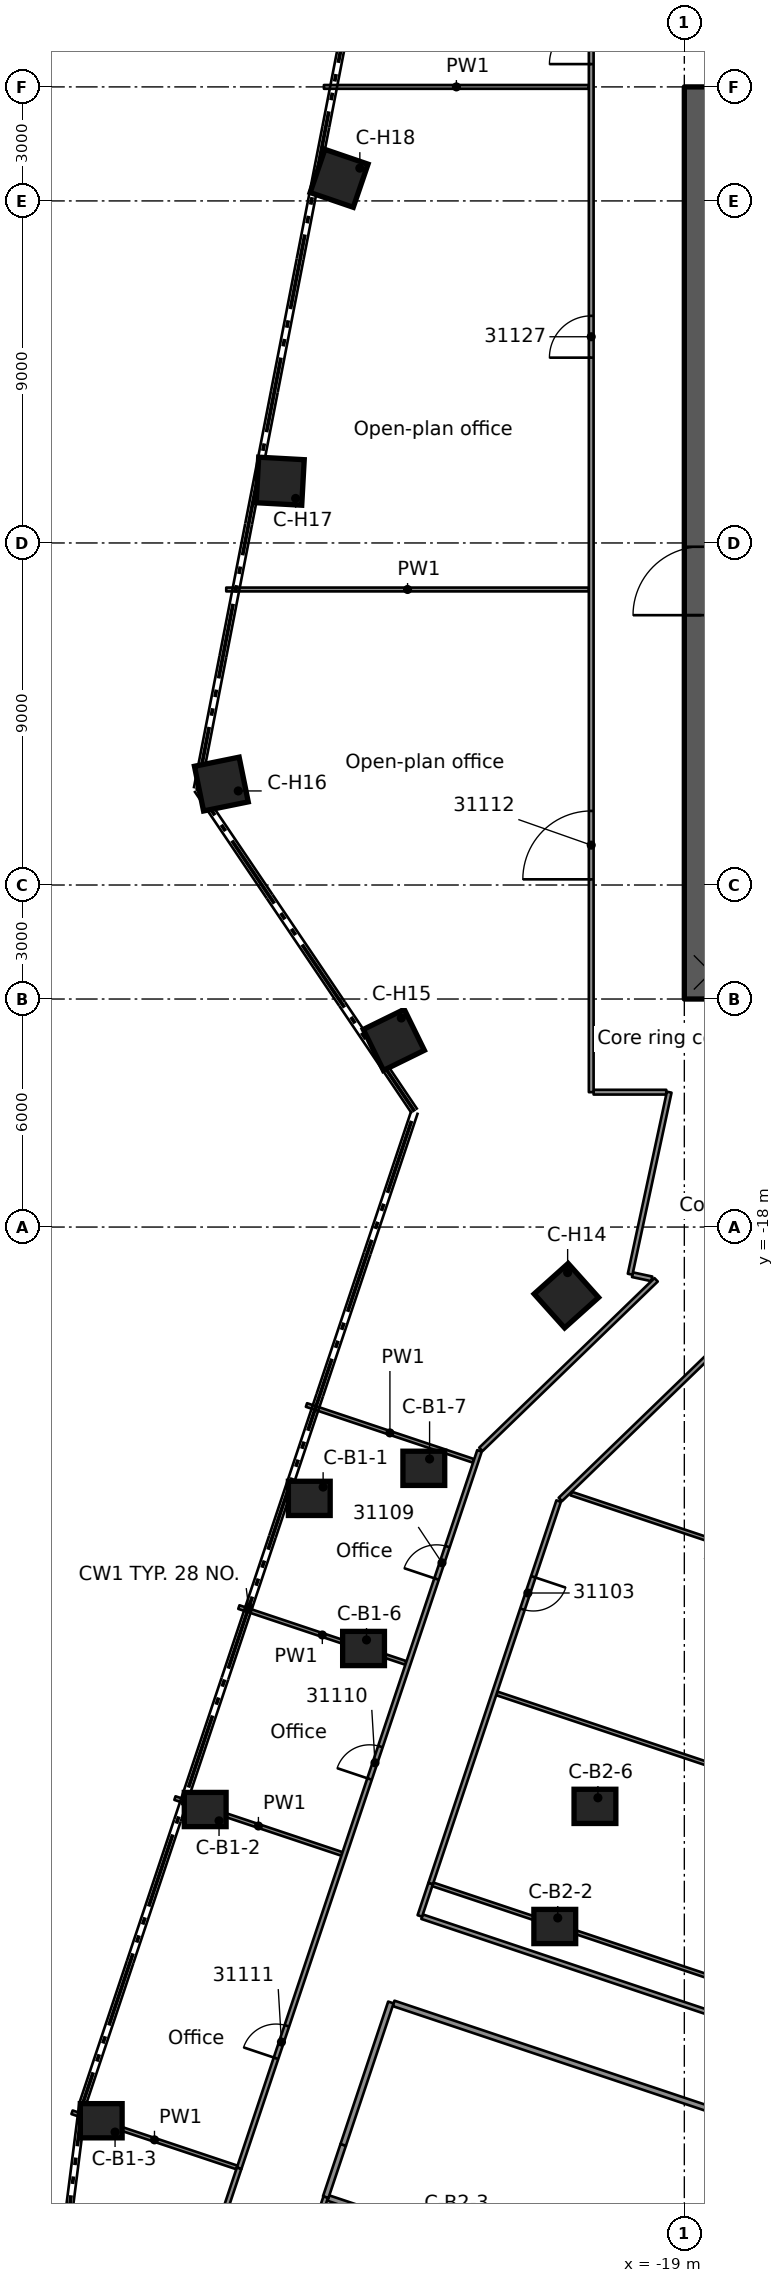
"""IFC4 building model, lengths in metres.
Left out: names, types, materials, properties, quantities, classifications, styles, units other than length and angle.
Written with IfcOpenShell. Run it as: python <this file> out.ifc"""

import sys

from ifc_helpers import new_model, si_unit, direction, frame, frame_2d, origin, origin_2d, place, context, subcontext, project, spatial, rectangle, extrude, element, fill, save


model = new_model("IFC4")
c1 = context("Model", 3, precision=1e-05, world=origin(), true_north=direction((0.0, 1.0)))
c2 = subcontext(c1, "Body", "Model", "MODEL_VIEW")
j1 = project(units=[si_unit("LENGTHUNIT", "METRE"), si_unit("PLANEANGLEUNIT", "RADIAN")], contexts=[c1])
p1 = place(None, origin())
s1 = spatial("IfcSite", under=j1, at=p1, CompositionType="ELEMENT")
p2 = place(p1, origin())
s2 = spatial("IfcBuilding", under=s1, at=p2, CompositionType="ELEMENT")
p3 = place(p2, frame((0.0, 0.0, 156.1)))
s3 = spatial("IfcBuildingStorey", under=s2, at=p3, CompositionType="ELEMENT", Elevation=156.1)
p4 = place(p3, frame((-18.55, -12.0, 0.0), z_axis=(0.0, 0.0, 1.0), x_axis=(0.0, 1.0, 0.0)))
e1 = element("IfcWall", 1, at=p4, inside=s3, PredefinedType="SHEAR", context=c2, shape_type="SweptSolid", body=[
    extrude(rectangle(XDim=24.0, YDim=0.9, at=frame_2d((12.0, 0.0))), origin(), (0.0, 0.0, 1.0), 3.5),
])
p5 = place(p4, frame((10.1, 0.0, 0.0)))
e2 = element("IfcOpeningElement", 2, at=p5, cuts=e1, PredefinedType="OPENING", context=c2, shape_type="SweptSolid", body=[
    extrude(rectangle(XDim=1.8, YDim=2.1, at=frame_2d((0.9, 1.05))), frame((0.0, 0.46, 0.0), z_axis=(0.0, -1.0, 0.0), x_axis=(1.0, 0.0, 0.0)), (0.0, 0.0, 1.0), 0.92),
])
for number, where, z_axis, x_axis in (
    (3, (-28.869, -25.139, 0.0), (0.0, 0.0, 1.0), (1.0, 0.0, 0.0)),
    (4, (-31.608, -33.326, 0.0), (0.0, 0.0, 1.0), (1.0, 0.0, 0.0)),
    (5, (-34.344, -41.515, 0.0), (0.0, 0.0, 1.0), (1.0, 0.0, 0.0)),
    (6, (-27.441, -29.089, 0.0), (0.0, 0.0, 1.0), (1.0, 0.0, 0.0)),
    (7, (-25.855, -24.348, 0.0), (0.0, 0.0, 1.0), (1.0, 0.0, 0.0)),
    (8, (-22.409, -36.404, 0.0), (0.0, 0.0, 1.0), (1.0, 0.0, 0.0)),
    (9, (-21.352, -33.243, 0.0), (0.0, 0.0, 1.0), (1.0, 0.0, 0.0)),
):
    element("IfcColumn", number, at=place(p3, frame(where, z_axis=z_axis, x_axis=x_axis)), inside=s3, PredefinedType="COLUMN", context=c2, shape_type="SweptSolid", body=[
        extrude(rectangle(XDim=1.1, YDim=0.9, at=origin_2d()), origin(), (0.0, 0.0, 1.0), 3.5),
    ])
for number, where, z_axis, x_axis in (
    (10, (-22.104, -19.806, 0.0), (0.0, 0.0, 1.0), (-0.745, -0.667, 0.0)),
    (11, (-26.644, -13.075, 0.0), (0.0, 0.0, 1.0), (-0.898, -0.441, 0.0)),
    (12, (-31.183, -6.344, 0.0), (0.0, 0.0, 1.0), (-0.98, -0.199, 0.0)),
    (13, (-29.634, 1.625, 0.0), (0.0, 0.0, 1.0), (-0.998, 0.055, 0.0)),
    (14, (-28.085, 9.594, 0.0), (0.0, 0.0, 1.0), (-0.946, 0.323, 0.0)),
):
    element("IfcColumn", number, at=place(p3, frame(where, z_axis=z_axis, x_axis=x_axis)), inside=s3, PredefinedType="COLUMN", context=c2, shape_type="SweptSolid", body=[
        extrude(rectangle(XDim=1.2, YDim=1.2, at=origin_2d()), origin(), (0.0, 0.0, 1.0), 3.5),
    ])
p6 = place(p3, frame((-35.112, -41.292, 0.0), z_axis=(0.0, 0.0, 1.0), x_axis=(0.94831984375, -0.317316047419, 0.0)))
e15 = element("IfcWall", 15, at=p6, inside=s3, PredefinedType="PARTITIONING", context=c2, shape_type="SweptSolid", body=[
    extrude(rectangle(XDim=4.576, YDim=0.1, at=frame_2d((2.288, 0.0))), origin(), (0.0, 0.0, 1.0), 3.08),
])
p7 = place(p3, frame((-28.366, -43.55, 0.0), z_axis=(0.0, 0.0, 1.0), x_axis=(0.948327152728, -0.317294203223, 0.0)))
e16 = element("IfcWall", 16, at=p7, inside=s3, PredefinedType="PARTITIONING", context=c2, shape_type="SweptSolid", body=[
    extrude(rectangle(XDim=26.162, YDim=0.15, at=frame_2d((13.081, 0.0))), origin(), (0.0, 0.0, 1.0), 3.08),
])
p8 = place(p3, frame((-1.841, -46.728, 0.0), z_axis=(0.0, 0.0, 1.0), x_axis=(-0.94832621322, 0.317297011205, 0.0)))
e17 = element("IfcWall", 17, at=p8, inside=s3, PredefinedType="PARTITIONING", context=c2, shape_type="SweptSolid", body=[
    extrude(rectangle(XDim=26.162, YDim=0.15, at=frame_2d((13.081, 0.0))), origin(), (0.0, 0.0, 1.0), 3.08),
])
p9 = place(p8, frame((12.525, 0.0, 0.0)))
e18 = element("IfcOpeningElement", 18, at=p9, cuts=e17, PredefinedType="OPENING", context=c2, shape_type="SweptSolid", body=[
    extrude(rectangle(XDim=0.9, YDim=2.1, at=frame_2d((0.45, 1.05))), frame((0.0, 0.085, 0.0), z_axis=(0.0, -1.0, 0.0), x_axis=(1.0, 0.0, 0.0)), (0.0, 0.0, 1.0), 0.17),
])
p10 = place(p3, frame((-25.901, -36.146, 0.0), z_axis=(0.0, 0.0, 1.0), x_axis=(0.948326561211, -0.317295971139, 0.0)))
e19 = element("IfcWall", 19, at=p10, inside=s3, PredefinedType="PARTITIONING", context=c2, shape_type="SweptSolid", body=[
    extrude(rectangle(XDim=26.187, YDim=0.125, at=frame_2d((13.094, 0.0))), origin(), (0.0, 0.0, 1.0), 3.08),
])
p11 = place(p10, frame((11.288, 0.0, 0.0)))
e20 = element("IfcOpeningElement", 20, at=p11, cuts=e19, PredefinedType="OPENING", context=c2, shape_type="SweptSolid", body=[
    extrude(rectangle(XDim=0.9, YDim=2.1, at=frame_2d((0.45, 1.05))), frame((0.0, 0.073, 0.0), z_axis=(0.0, -1.0, 0.0), x_axis=(1.0, 0.0, 0.0)), (0.0, 0.0, 1.0), 0.145),
])
p12 = place(p3, frame((-32.404, -33.025, 0.0), z_axis=(0.0, 0.0, 1.0), x_axis=(0.948382448694, -0.317128887062, 0.0)))
e21 = element("IfcWall", 21, at=p12, inside=s3, PredefinedType="PARTITIONING", context=c2, shape_type="SweptSolid", body=[
    extrude(rectangle(XDim=4.632, YDim=0.1, at=frame_2d((2.316, 0.0))), origin(), (0.0, 0.0, 1.0), 3.08),
])
p13 = place(p3, frame((-25.617, -35.296, 0.0), z_axis=(0.0, 0.0, 1.0), x_axis=(0.948326561211, -0.317295971139, 0.0)))
e22 = element("IfcWall", 22, at=p13, inside=s3, PredefinedType="PARTITIONING", context=c2, shape_type="SweptSolid", body=[
    extrude(rectangle(XDim=26.187, YDim=0.1, at=frame_2d((13.094, 0.0))), origin(), (0.0, 0.0, 1.0), 3.08),
])
p14 = place(p3, frame((-30.722, -27.999, 0.0), z_axis=(0.0, 0.0, 1.0), x_axis=(0.948355935611, -0.317208164132, 0.0)))
e23 = element("IfcWall", 23, at=p14, inside=s3, PredefinedType="PARTITIONING", context=c2, shape_type="SweptSolid", body=[
    extrude(rectangle(XDim=4.631, YDim=0.1, at=frame_2d((2.315, 0.0))), origin(), (0.0, 0.0, 1.0), 3.08),
])
p15 = place(p3, frame((-23.935, -30.27, 0.0), z_axis=(0.0, 0.0, 1.0), x_axis=(0.948326561211, -0.317295971139, 0.0)))
e24 = element("IfcWall", 24, at=p15, inside=s3, PredefinedType="PARTITIONING", context=c2, shape_type="SweptSolid", body=[
    extrude(rectangle(XDim=26.187, YDim=0.1, at=frame_2d((13.094, 0.0))), origin(), (0.0, 0.0, 1.0), 3.08),
])
p16 = place(p3, frame((-28.943, -22.682, 0.0), z_axis=(0.0, 0.0, 1.0), x_axis=(0.948361239818, -0.317192305725, 0.0)))
e25 = element("IfcWall", 25, at=p16, inside=s3, PredefinedType="PARTITIONING", context=c2, shape_type="SweptSolid", body=[
    extrude(rectangle(XDim=4.631, YDim=0.1, at=frame_2d((2.316, 0.0))), origin(), (0.0, 0.0, 1.0), 3.08),
])
p17 = place(p3, frame((-21.98, -25.012, 0.0), z_axis=(0.0, 0.0, 1.0), x_axis=(0.948330909895, -0.317282973603, 0.0)))
e26 = element("IfcWall", 26, at=p17, inside=s3, PredefinedType="PARTITIONING", context=c2, shape_type="SweptSolid", body=[
    extrude(rectangle(XDim=25.816, YDim=0.1, at=frame_2d((12.908, 0.0))), origin(), (0.0, 0.0, 1.0), 3.08),
])
p18 = place(p3, frame((-20.364, -19.254, 0.0), z_axis=(0.0, 0.0, 1.0), x_axis=(0.977699164018, -0.210010344217, 0.0)))
e27 = element("IfcWall", 27, at=p18, inside=s3, PredefinedType="PARTITIONING", context=c2, shape_type="SweptSolid", body=[
    extrude(rectangle(XDim=0.52, YDim=0.125, at=frame_2d((0.26, 0.0))), origin(), (0.0, 0.0, 1.0), 3.08),
])
p19 = place(p3, frame((-21.387, -14.451, 0.0), z_axis=(0.0, 0.0, 1.0), x_axis=(1.0, 0.0, 0.0)))
e28 = element("IfcWall", 28, at=p19, inside=s3, PredefinedType="PARTITIONING", context=c2, shape_type="SweptSolid", body=[
    extrude(rectangle(XDim=1.912, YDim=0.125, at=frame_2d((0.956, 0.0))), origin(), (0.0, 0.0, 1.0), 3.08),
])
p20 = place(p3, frame((-31.054, -1.224, 0.0), z_axis=(0.0, 0.0, 1.0), x_axis=(1.0, 0.0, 0.0)))
e29 = element("IfcWall", 29, at=p20, inside=s3, PredefinedType="PARTITIONING", context=c2, shape_type="SweptSolid", body=[
    extrude(rectangle(XDim=9.542, YDim=0.1, at=frame_2d((4.771, 0.0))), origin(), (0.0, 0.0, 1.0), 3.08),
])
p21 = place(p3, frame((-28.484, 12.0, 0.0), z_axis=(0.0, 0.0, 1.0), x_axis=(1.0, 0.0, 0.0)))
e30 = element("IfcWall", 30, at=p21, inside=s3, PredefinedType="PARTITIONING", context=c2, shape_type="SweptSolid", body=[
    extrude(rectangle(XDim=6.972, YDim=0.1, at=frame_2d((3.486, 0.0))), origin(), (0.0, 0.0, 1.0), 3.08),
])
p22 = place(p3, frame((-17.547, -20.605, 0.0), z_axis=(0.0, 0.0, 1.0), x_axis=(-0.718656118165, -0.695365647572, 0.0)))
e31 = element("IfcWall", 31, at=p22, inside=s3, PredefinedType="PARTITIONING", context=c2, shape_type="SweptSolid", body=[
    extrude(rectangle(XDim=6.562, YDim=0.125, at=frame_2d((3.281, 0.0))), origin(), (0.0, 0.0, 1.0), 3.08),
])
p23 = place(p3, frame((-24.354, -23.85, 0.0), z_axis=(0.0, 0.0, 1.0), x_axis=(0.718689835624, 0.695330799095, 0.0)))
e32 = element("IfcWall", 32, at=p23, inside=s3, PredefinedType="PARTITIONING", context=c2, shape_type="SweptSolid", body=[
    extrude(rectangle(XDim=6.417, YDim=0.125, at=frame_2d((3.208, 0.0))), origin(), (0.0, 0.0, 1.0), 3.08),
])
p24 = place(p3, frame((-28.437, -43.526, 0.0), z_axis=(0.0, 0.0, 1.0), x_axis=(0.317640646832, 0.94821116819, 0.0)))
e33 = element("IfcWall", 33, at=p24, inside=s3, PredefinedType="PARTITIONING", context=c2, shape_type="SweptSolid", body=[
    extrude(rectangle(XDim=1.451, YDim=0.15, at=frame_2d((0.726, 0.0))), origin(), (0.0, 0.0, 1.0), 3.08),
])
p25 = place(p3, frame((-27.976, -42.15, 0.0), z_axis=(0.0, 0.0, 1.0), x_axis=(0.317413881712, 0.948287101935, 0.0)))
e34 = element("IfcWall", 34, at=p25, inside=s3, PredefinedType="PARTITIONING", context=c2, shape_type="SweptSolid", body=[
    extrude(rectangle(XDim=3.951, YDim=0.15, at=frame_2d((1.976, 0.0))), origin(), (0.0, 0.0, 1.0), 3.08),
])
p26 = place(p3, frame((-22.307, -25.21, 0.0), z_axis=(0.0, 0.0, 1.0), x_axis=(-0.317400526235, -0.948291572221, 0.0)))
e35 = element("IfcWall", 35, at=p26, inside=s3, PredefinedType="PARTITIONING", context=c2, shape_type="SweptSolid", body=[
    extrude(rectangle(XDim=10.615, YDim=0.125, at=frame_2d((5.307, 0.0))), origin(), (0.0, 0.0, 1.0), 3.08),
])
p27 = place(p26, frame((2.101, 0.0, 0.0)))
e36 = element("IfcOpeningElement", 36, at=p27, cuts=e35, PredefinedType="OPENING", context=c2, shape_type="SweptSolid", body=[
    extrude(rectangle(XDim=0.9, YDim=2.1, at=frame_2d((0.45, 1.05))), frame((0.0, 0.073, 0.0), z_axis=(0.0, -1.0, 0.0), x_axis=(1.0, 0.0, 0.0)), (0.0, 0.0, 1.0), 0.145),
])
p28 = place(p3, frame((-29.23, -45.897, 0.0), z_axis=(0.0, 0.0, 1.0), x_axis=(0.317165045262, 0.948370357015, 0.0)))
e37 = element("IfcWall", 37, at=p28, inside=s3, PredefinedType="PARTITIONING", context=c2, shape_type="SweptSolid", body=[
    extrude(rectangle(XDim=2.5, YDim=0.125, at=frame_2d((1.25, 0.0))), origin(), (0.0, 0.0, 1.0), 3.08),
])
p29 = place(p3, frame((-25.96, -36.126, 0.0), z_axis=(0.0, 0.0, 1.0), x_axis=(0.316799745903, 0.948492446462, 0.0)))
e38 = element("IfcWall", 38, at=p29, inside=s3, PredefinedType="PARTITIONING", context=c2, shape_type="SweptSolid", body=[
    extrude(rectangle(XDim=0.896, YDim=0.125, at=frame_2d((0.448, 0.0))), origin(), (0.0, 0.0, 1.0), 3.08),
])
p30 = place(p3, frame((-30.714, -42.764, 0.0), z_axis=(0.0, 0.0, 1.0), x_axis=(0.317699123241, 0.94819157721, 0.0)))
e39 = element("IfcWall", 39, at=p30, inside=s3, PredefinedType="PARTITIONING", context=c2, shape_type="SweptSolid", body=[
    extrude(rectangle(XDim=19.906, YDim=0.125, at=frame_2d((9.953, 0.0))), origin(), (0.0, 0.0, 1.0), 3.08),
])
p31 = place(p30, frame((16.35, 0.0, 0.0)))
e40 = element("IfcOpeningElement", 40, at=p31, cuts=e39, PredefinedType="OPENING", context=c2, shape_type="SweptSolid", body=[
    extrude(rectangle(XDim=0.9, YDim=2.1, at=frame_2d((0.45, 1.05))), frame((0.0, 0.073, 0.0), z_axis=(0.0, -1.0, 0.0), x_axis=(1.0, 0.0, 0.0)), (0.0, 0.0, 1.0), 0.145),
])
p32 = place(p30, frame((10.8, 0.0, 0.0)))
e41 = element("IfcOpeningElement", 41, at=p32, cuts=e39, PredefinedType="OPENING", context=c2, shape_type="SweptSolid", body=[
    extrude(rectangle(XDim=0.9, YDim=2.1, at=frame_2d((0.45, 1.05))), frame((0.0, 0.073, 0.0), z_axis=(0.0, -1.0, 0.0), x_axis=(1.0, 0.0, 0.0)), (0.0, 0.0, 1.0), 0.145),
])
p33 = place(p30, frame((3.051, 0.0, 0.0)))
e42 = element("IfcOpeningElement", 42, at=p33, cuts=e39, PredefinedType="OPENING", context=c2, shape_type="SweptSolid", body=[
    extrude(rectangle(XDim=0.9, YDim=2.1, at=frame_2d((0.45, 1.05))), frame((0.0, 0.073, 0.0), z_axis=(0.0, -1.0, 0.0), x_axis=(1.0, 0.0, 0.0)), (0.0, 0.0, 1.0), 0.145),
])
p34 = place(p3, frame((-30.715, -42.765, 0.0), z_axis=(0.0, 0.0, 1.0), x_axis=(-0.31696020199, -0.948438838489, 0.0)))
e43 = element("IfcWall", 43, at=p34, inside=s3, PredefinedType="PARTITIONING", context=c2, shape_type="SweptSolid", body=[
    extrude(rectangle(XDim=5.199, YDim=0.125, at=frame_2d((2.6, 0.0))), origin(), (0.0, 0.0, 1.0), 3.08),
])
p35 = place(p3, frame((-19.398, -14.451, 0.0), z_axis=(0.0, 0.0, 1.0), x_axis=(-0.209848984455, -0.977733810259, 0.0)))
e44 = element("IfcWall", 44, at=p35, inside=s3, PredefinedType="PARTITIONING", context=c2, shape_type="SweptSolid", body=[
    extrude(rectangle(XDim=4.899, YDim=0.125, at=frame_2d((2.45, 0.0))), origin(), (0.0, 0.0, 1.0), 3.08),
])
p36 = place(p3, frame((-21.45, -14.451, 0.0), z_axis=(0.0, 0.0, 1.0), x_axis=(0.0, 1.0, 0.0)))
e45 = element("IfcWall", 45, at=p36, inside=s3, PredefinedType="PARTITIONING", context=c2, shape_type="SweptSolid", body=[
    extrude(rectangle(XDim=28.902, YDim=0.125, at=frame_2d((14.451, 0.0))), origin(), (0.0, 0.0, 1.0), 3.08),
])
p37 = place(p36, frame((5.6, 0.0, 0.0)))
e46 = element("IfcOpeningElement", 46, at=p37, cuts=e45, PredefinedType="OPENING", context=c2, shape_type="SweptSolid", body=[
    extrude(rectangle(XDim=1.8, YDim=2.1, at=frame_2d((0.9, 1.05))), frame((0.0, 0.073, 0.0), z_axis=(0.0, -1.0, 0.0), x_axis=(1.0, 0.0, 0.0)), (0.0, 0.0, 1.0), 0.145),
])
p38 = place(p36, frame((27.051, 0.0, 0.0)))
e47 = element("IfcOpeningElement", 47, at=p38, cuts=e45, PredefinedType="OPENING", context=c2, shape_type="SweptSolid", body=[
    extrude(rectangle(XDim=1.1, YDim=2.1, at=frame_2d((0.55, 1.05))), frame((0.0, 0.073, 0.0), z_axis=(0.0, -1.0, 0.0), x_axis=(1.0, 0.0, 0.0)), (0.0, 0.0, 1.0), 0.145),
])
p39 = place(p36, frame((19.327, 0.0, 0.0)))
e48 = element("IfcOpeningElement", 48, at=p39, cuts=e45, PredefinedType="OPENING", context=c2, shape_type="SweptSolid", body=[
    extrude(rectangle(XDim=1.1, YDim=2.1, at=frame_2d((0.55, 1.05))), frame((0.0, 0.073, 0.0), z_axis=(0.0, -1.0, 0.0), x_axis=(1.0, 0.0, 0.0)), (0.0, 0.0, 1.0), 0.145),
])
p40 = place(p5, origin())
e49 = element("IfcDoor", 49, at=p40, inside=s3, OperationType="SINGLE_SWING_LEFT", PredefinedType="DOOR", context=c2, shape_type="SweptSolid", body=[
    extrude(rectangle(XDim=1.8, YDim=2.1, at=frame_2d((0.9, 1.05))), frame((0.0, 0.025, 0.0), z_axis=(0.0, -1.0, 0.0), x_axis=(1.0, 0.0, 0.0)), (0.0, 0.0, 1.0), 0.05),
])
fill(e2, e49)
p41 = place(p27, origin())
e50 = element("IfcDoor", 50, at=p41, inside=s3, OperationType="SINGLE_SWING_LEFT", PredefinedType="DOOR", context=c2, shape_type="SweptSolid", body=[
    extrude(rectangle(XDim=0.9, YDim=2.1, at=frame_2d((0.45, 1.05))), frame((0.0, 0.025, 0.0), z_axis=(0.0, -1.0, 0.0), x_axis=(1.0, 0.0, 0.0)), (0.0, 0.0, 1.0), 0.05),
])
fill(e36, e50)
p42 = place(p31, origin())
e51 = element("IfcDoor", 51, at=p42, inside=s3, OperationType="SINGLE_SWING_RIGHT", PredefinedType="DOOR", context=c2, shape_type="SweptSolid", body=[
    extrude(rectangle(XDim=0.9, YDim=2.1, at=frame_2d((0.45, 1.05))), frame((0.0, 0.025, 0.0), z_axis=(0.0, -1.0, 0.0), x_axis=(1.0, 0.0, 0.0)), (0.0, 0.0, 1.0), 0.05),
])
fill(e40, e51)
p43 = place(p32, origin())
e52 = element("IfcDoor", 52, at=p43, inside=s3, OperationType="SINGLE_SWING_RIGHT", PredefinedType="DOOR", context=c2, shape_type="SweptSolid", body=[
    extrude(rectangle(XDim=0.9, YDim=2.1, at=frame_2d((0.45, 1.05))), frame((0.0, 0.025, 0.0), z_axis=(0.0, -1.0, 0.0), x_axis=(1.0, 0.0, 0.0)), (0.0, 0.0, 1.0), 0.05),
])
fill(e41, e52)
p44 = place(p33, origin())
e53 = element("IfcDoor", 53, at=p44, inside=s3, OperationType="SINGLE_SWING_LEFT", PredefinedType="DOOR", context=c2, shape_type="SweptSolid", body=[
    extrude(rectangle(XDim=0.9, YDim=2.1, at=frame_2d((0.45, 1.05))), frame((0.0, 0.025, 0.0), z_axis=(0.0, -1.0, 0.0), x_axis=(1.0, 0.0, 0.0)), (0.0, 0.0, 1.0), 0.05),
])
fill(e42, e53)
p45 = place(p37, origin())
e54 = element("IfcDoor", 54, at=p45, inside=s3, OperationType="DOUBLE_DOOR_SINGLE_SWING", PredefinedType="DOOR", context=c2, shape_type="SweptSolid", body=[
    extrude(rectangle(XDim=1.8, YDim=2.1, at=frame_2d((0.9, 1.05))), frame((0.0, 0.025, 0.0), z_axis=(0.0, -1.0, 0.0), x_axis=(1.0, 0.0, 0.0)), (0.0, 0.0, 1.0), 0.05),
])
fill(e46, e54)
p46 = place(p38, origin())
e55 = element("IfcDoor", 55, at=p46, inside=s3, OperationType="SINGLE_SWING_RIGHT", PredefinedType="DOOR", context=c2, shape_type="SweptSolid", body=[
    extrude(rectangle(XDim=1.1, YDim=2.1, at=frame_2d((0.55, 1.05))), frame((0.0, 0.025, 0.0), z_axis=(0.0, -1.0, 0.0), x_axis=(1.0, 0.0, 0.0)), (0.0, 0.0, 1.0), 0.05),
])
fill(e47, e55)
p47 = place(p39, origin())
e56 = element("IfcDoor", 56, at=p47, inside=s3, OperationType="SINGLE_SWING_RIGHT", PredefinedType="DOOR", context=c2, shape_type="SweptSolid", body=[
    extrude(rectangle(XDim=1.1, YDim=2.1, at=frame_2d((0.55, 1.05))), frame((0.0, 0.025, 0.0), z_axis=(0.0, -1.0, 0.0), x_axis=(1.0, 0.0, 0.0)), (0.0, 0.0, 1.0), 0.05),
])
fill(e48, e56)
save(model, sys.argv[1])
